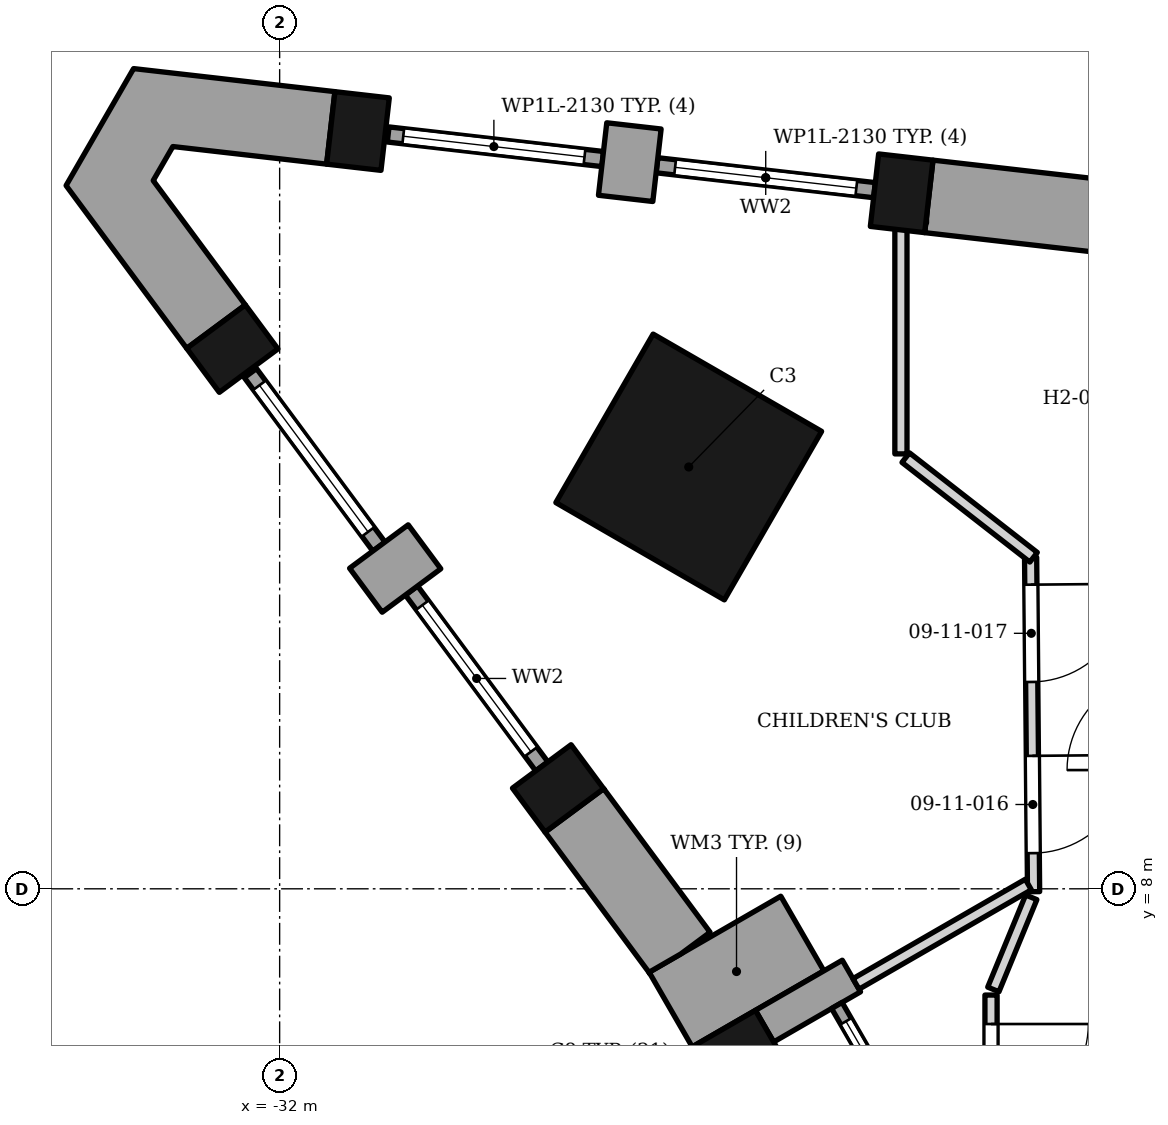
"""IFC4 building model, lengths in metres.
Left out: names, types, materials, properties, quantities, classifications, styles, units other than length and angle.
Written with IfcOpenShell. Run it as: python <this file> out.ifc"""

import sys

from ifc_helpers import new_model, si_unit, direction, frame, frame_2d, origin, origin_2d, place, context, subcontext, project, spatial, polyline, rectangle, outline, extrude, element, fill, save


model = new_model("IFC4")
c1 = context("Model", 3, precision=1e-05, world=origin(), true_north=direction((0.0, 1.0)))
c2 = subcontext(c1, "Body", "Model", "MODEL_VIEW")
j1 = project(units=[si_unit("LENGTHUNIT", "METRE"), si_unit("PLANEANGLEUNIT", "RADIAN")], contexts=[c1])
p1 = place(None, origin())
s1 = spatial("IfcSite", under=j1, at=p1, CompositionType="ELEMENT")
p2 = place(p1, origin())
s2 = spatial("IfcBuilding", under=s1, at=p2, CompositionType="ELEMENT")
p3 = place(p2, frame((0.0, 0.0, 56.2)))
s3 = spatial("IfcBuildingStorey", under=s2, at=p3, CompositionType="ELEMENT", Elevation=56.2)
p4 = place(p3, frame((-25.272, 14.937, 0.0), z_axis=(0.0, 0.0, 1.0), x_axis=(0.866025412511, -0.499999984885, 0.0)))
e1 = element("IfcColumn", 1, at=p4, inside=s3, PredefinedType="COLUMN", context=c2, shape_type="SweptSolid", body=[
    extrude(rectangle(XDim=3.2, YDim=3.2, at=origin_2d()), origin(), (0.0, 0.0, 1.0), 3.4),
])
for number, where, z_axis, x_axis in (
    (2, (-24.47, 5.311, 0.0), (0.0, 0.0, 1.0), (0.5, -0.866, 0.0)),
    (3, (-21.77, 19.438, 0.0), (0.0, 0.0, 1.0), (-0.994, 0.114, 0.0)),
    (4, (-30.712, 20.462, 0.0), (0.0, 0.0, 1.0), (-0.994, 0.114, 0.0)),
    (5, (-32.778, 16.883, 0.0), (0.0, 0.0, 1.0), (0.595, -0.804, 0.0)),
    (6, (-27.421, 9.651, 0.0), (0.0, 0.0, 1.0), (0.595, -0.804, 0.0)),
):
    element("IfcColumn", number, at=place(p3, frame(where, z_axis=z_axis, x_axis=x_axis)), inside=s3, PredefinedType="COLUMN", context=c2, shape_type="SweptSolid", body=[
        extrude(rectangle(XDim=0.9, YDim=1.2, at=origin_2d()), origin(), (0.0, 0.0, 1.0), 3.4),
    ])
p5 = place(p3, frame((-22.596, 6.566, 0.0), z_axis=(0.0, 0.0, 1.0), x_axis=(-0.866040211805, -0.499974350878, 0.0)))
e7 = element("IfcWall", 7, at=p5, inside=s3, PredefinedType="SOLIDWALL", context=c2, shape_type="SweptSolid", body=[
    extrude(rectangle(XDim=1.65, YDim=0.6, at=frame_2d((0.825, 0.0))), origin(), (0.0, 0.0, 1.0), 2.45),
])
p6 = place(p3, frame((-22.836, 6.081, 0.0), z_axis=(0.0, 0.0, 1.0), x_axis=(0.500002543286, -0.866023935413, 0.0)))
e8 = element("IfcWall", 8, at=p6, inside=s3, PredefinedType="ELEMENTEDWALL", context=c2, shape_type="SweptSolid", body=[
    extrude(rectangle(XDim=4.2, YDim=0.2, at=frame_2d((2.1, 0.0))), origin(), (0.0, 0.0, 1.0), 2.45),
])
p7 = place(p6, frame((0.3, 0.0, 0.6)))
e9 = element("IfcOpeningElement", 9, at=p7, cuts=e8, PredefinedType="OPENING", context=c2, shape_type="SweptSolid", body=[
    extrude(rectangle(XDim=2.1, YDim=1.75, at=frame_2d((1.05, 0.875))), frame((0.0, 0.11, 0.0), z_axis=(0.0, -1.0, 0.0), x_axis=(1.0, 0.0, 0.0)), (0.0, 0.0, 1.0), 0.22),
])
p8 = place(p6, frame((2.7, 0.0, 0.0)))
e10 = element("IfcOpeningElement", 10, at=p8, cuts=e8, PredefinedType="OPENING", context=c2, shape_type="SweptSolid", body=[
    extrude(rectangle(XDim=1.2, YDim=2.35, at=frame_2d((0.6, 1.175))), frame((0.0, 0.11, 0.0), z_axis=(0.0, -1.0, 0.0), x_axis=(1.0, 0.0, 0.0)), (0.0, 0.0, 1.0), 0.22),
])
p9 = place(p3, frame((-25.569, 6.014, 0.0), z_axis=(0.0, 0.0, 1.0), x_axis=(0.866022959057, 0.500004234368, 0.0)))
e11 = element("IfcWall", 11, at=p9, inside=s3, PredefinedType="SOLIDWALL", context=c2, shape_type="SweptSolid", body=[
    extrude(rectangle(XDim=2.5, YDim=1.417, at=frame_2d((1.25, 0.0))), origin(), (0.0, 0.0, 1.0), 2.63),
])
p10 = place(p3, frame((-26.173, 20.546, 0.0), z_axis=(0.0, 0.0, 1.0), x_axis=(-0.113735952551, -0.993511013073, 0.0)))
e12 = element("IfcWall", 12, at=p10, inside=s3, PredefinedType="SOLIDWALL", context=c2, shape_type="SweptSolid", body=[
    extrude(rectangle(XDim=1.2, YDim=0.9, at=frame_2d((0.6, 0.0))), origin(), (0.0, 0.0, 1.0), 2.63),
])
p11 = place(p3, frame((-22.218, 19.489, 0.0), z_axis=(0.0, 0.0, 1.0), x_axis=(-0.993504225498, 0.113795228013, 0.0)))
e13 = element("IfcWall", 13, at=p11, inside=s3, PredefinedType="ELEMENTEDWALL", context=c2, shape_type="SweptSolid", body=[
    extrude(rectangle(XDim=3.6, YDim=0.25, at=frame_2d((1.8, 0.0))), origin(), (0.0, 0.0, 1.0), 2.63),
])
p12 = place(p11, frame((0.3, 0.0, 0.3)))
e14 = element("IfcOpeningElement", 14, at=p12, cuts=e13, PredefinedType="OPENING", context=c2, shape_type="SweptSolid", body=[
    extrude(rectangle(XDim=3.0, YDim=2.13, at=frame_2d((1.5, 1.065))), frame((0.0, 0.135, 0.0), z_axis=(0.0, -1.0, 0.0), x_axis=(1.0, 0.0, 0.0)), (0.0, 0.0, 1.0), 0.27),
])
p13 = place(p3, frame((-26.686, 20.001, 0.0), z_axis=(0.0, 0.0, 1.0), x_axis=(-0.993509390647, 0.113750123938, 0.0)))
e15 = element("IfcWall", 15, at=p13, inside=s3, PredefinedType="ELEMENTEDWALL", context=c2, shape_type="SweptSolid", body=[
    extrude(rectangle(XDim=3.552, YDim=0.25, at=frame_2d((1.776, 0.0))), origin(), (0.0, 0.0, 1.0), 2.63),
])
p14 = place(p13, frame((0.302, 0.0, 0.3)))
e16 = element("IfcOpeningElement", 16, at=p14, cuts=e15, PredefinedType="OPENING", context=c2, shape_type="SweptSolid", body=[
    extrude(rectangle(XDim=3.0, YDim=2.13, at=frame_2d((1.5, 1.065))), frame((0.0, 0.135, 0.0), z_axis=(0.0, -1.0, 0.0), x_axis=(1.0, 0.0, 0.0)), (0.0, 0.0, 1.0), 0.27),
])
p15 = place(p3, frame((-30.582, 12.91, 0.0), z_axis=(0.0, 0.0, 1.0), x_axis=(0.803549985832, 0.595237280644, 0.0)))
e17 = element("IfcWall", 17, at=p15, inside=s3, PredefinedType="SOLIDWALL", context=c2, shape_type="SweptSolid", body=[
    extrude(rectangle(XDim=1.2, YDim=0.9, at=frame_2d((0.6, 0.0))), origin(), (0.0, 0.0, 1.0), 2.63),
])
p16 = place(p3, frame((-32.481, 16.481, 0.0), z_axis=(0.0, 0.0, 1.0), x_axis=(0.595304805086, -0.803499962067, 0.0)))
e18 = element("IfcWall", 18, at=p16, inside=s3, PredefinedType="ELEMENTEDWALL", context=c2, shape_type="SweptSolid", body=[
    extrude(rectangle(XDim=3.552, YDim=0.25, at=frame_2d((1.776, 0.0))), origin(), (0.0, 0.0, 1.0), 2.63),
])
p17 = place(p16, frame((0.25, 0.0, 0.3)))
e19 = element("IfcOpeningElement", 19, at=p17, cuts=e18, PredefinedType="OPENING", context=c2, shape_type="SweptSolid", body=[
    extrude(rectangle(XDim=3.0, YDim=2.13, at=frame_2d((1.5, 1.065))), frame((0.0, 0.135, 0.0), z_axis=(0.0, -1.0, 0.0), x_axis=(1.0, 0.0, 0.0)), (0.0, 0.0, 1.0), 0.27),
])
p18 = place(p3, frame((-29.832, 12.906, 0.0), z_axis=(0.0, 0.0, 1.0), x_axis=(0.595302153335, -0.803501926715, 0.0)))
e20 = element("IfcWall", 20, at=p18, inside=s3, PredefinedType="ELEMENTEDWALL", context=c2, shape_type="SweptSolid", body=[
    extrude(rectangle(XDim=3.6, YDim=0.25, at=frame_2d((1.8, 0.0))), origin(), (0.0, 0.0, 1.0), 2.63),
])
p19 = place(p18, frame((0.3, 0.0, 0.3)))
e21 = element("IfcOpeningElement", 21, at=p19, cuts=e20, PredefinedType="OPENING", context=c2, shape_type="SweptSolid", body=[
    extrude(rectangle(XDim=3.0, YDim=2.13, at=frame_2d((1.5, 1.065))), frame((0.0, 0.135, 0.0), z_axis=(0.0, -1.0, 0.0), x_axis=(1.0, 0.0, 0.0)), (0.0, 0.0, 1.0), 0.27),
])
p20 = place(p3, origin())
e22 = element("IfcWall", 22, at=p20, inside=s3, PredefinedType="SOLIDWALL", context=c2, shape_type="SweptSolid", body=[
    extrude(outline(polyline([(-21.255, 19.983), (-21.391, 18.791), (-18.472, 18.457), (-18.0, 18.532), (-18.0, 19.052), (-17.94, 19.052), (-18.335, 19.649), (-21.255, 19.983)])), origin(), (0.0, 0.0, 1.0), 2.65),
])
p21 = place(p3, origin())
e23 = element("IfcWall", 23, at=p21, inside=s3, PredefinedType="SOLIDWALL", context=c2, shape_type="SweptSolid", body=[
    extrude(outline(polyline([(-33.756, 20.207), (-31.227, 19.917), (-31.091, 21.109), (-34.402, 21.489), (-35.512, 19.565), (-33.528, 16.887), (-32.564, 17.602), (-34.08, 19.647), (-33.756, 20.207)])), origin(), (0.0, 0.0, 1.0), 2.65),
])
p22 = place(p3, origin())
e24 = element("IfcWall", 24, at=p22, inside=s3, PredefinedType="SOLIDWALL", context=c2, shape_type="SweptSolid", body=[
    extrude(outline(polyline([(-24.921, 7.285), (-26.671, 9.647), (-26.671, 9.647), (-26.671, 9.646), (-27.635, 8.932), (-25.906, 6.599), (-25.923, 6.628), (-25.403, 6.928), (-24.921, 7.285)])), origin(), (0.0, 0.0, 1.0), 2.63),
])
p23 = place(p3, frame((-20.301, 6.253, 0.0), z_axis=(0.0, 0.0, 1.0), x_axis=(0.000103755965, -0.999999994617, 0.0)))
e25 = element("IfcWall", 25, at=p23, inside=s3, PredefinedType="PARTITIONING", context=c2, shape_type="SweptSolid", body=[
    extrude(rectangle(XDim=2.353, YDim=0.2, at=frame_2d((1.177, 0.0))), origin(), (0.0, 0.0, 1.0), 2.45),
])
p24 = place(p23, frame((0.476, 0.0, 0.0)))
e26 = element("IfcOpeningElement", 26, at=p24, cuts=e25, PredefinedType="OPENING", context=c2, shape_type="SweptSolid", body=[
    extrude(rectangle(XDim=1.6, YDim=2.1, at=frame_2d((0.8, 1.05))), frame((0.0, 0.11, 0.0), z_axis=(0.0, -1.0, 0.0), x_axis=(1.0, 0.0, 0.0)), (0.0, 0.0, 1.0), 0.22),
])
p25 = place(p3, frame((-20.262, 6.345, 0.0), z_axis=(0.0, 0.0, 1.0), x_axis=(0.380749805254, 0.924678098475, 0.0)))
e27 = element("IfcWall", 27, at=p25, inside=s3, PredefinedType="PARTITIONING", context=c2, shape_type="SweptSolid", body=[
    extrude(rectangle(XDim=1.638, YDim=0.2, at=frame_2d((0.819, 0.0))), origin(), (0.0, 0.0, 1.0), 3.23),
])
p26 = place(p3, frame((-19.649, 13.452, 0.0), z_axis=(0.0, 0.0, 1.0), x_axis=(0.00887867333, -0.999960583803, 0.0)))
e28 = element("IfcWall", 28, at=p26, inside=s3, PredefinedType="PARTITIONING", context=c2, shape_type="SweptSolid", body=[
    extrude(rectangle(XDim=5.5, YDim=0.2, at=frame_2d((2.75, 0.0))), origin(), (0.0, 0.0, 1.0), 3.23),
])
p27 = place(p26, frame((3.266, 0.0, 0.0)))
e29 = element("IfcOpeningElement", 29, at=p27, cuts=e28, PredefinedType="OPENING", context=c2, shape_type="SweptSolid", body=[
    extrude(rectangle(XDim=1.6, YDim=2.1, at=frame_2d((0.8, 1.05))), frame((0.0, 0.11, 0.0), z_axis=(0.0, -1.0, 0.0), x_axis=(1.0, 0.0, 0.0)), (0.0, 0.0, 1.0), 0.22),
])
p28 = place(p26, frame((0.45, 0.0, 0.0)))
e30 = element("IfcOpeningElement", 30, at=p28, cuts=e28, PredefinedType="OPENING", context=c2, shape_type="SweptSolid", body=[
    extrude(rectangle(XDim=1.6, YDim=2.1, at=frame_2d((0.8, 1.05))), frame((0.0, 0.11, 0.0), z_axis=(0.0, -1.0, 0.0), x_axis=(1.0, 0.0, 0.0)), (0.0, 0.0, 1.0), 0.22),
])
p29 = place(p3, frame((-22.521, 6.436, 0.0), z_axis=(0.0, 0.0, 1.0), x_axis=(0.866279994271, 0.499558776848, 0.0)))
e31 = element("IfcWall", 31, at=p29, inside=s3, PredefinedType="PARTITIONING", context=c2, shape_type="SweptSolid", body=[
    extrude(rectangle(XDim=3.271, YDim=0.2, at=frame_2d((1.636, 0.0))), origin(), (0.0, 0.0, 1.0), 2.552),
])
p30 = place(p3, frame((-21.703, 15.091, 0.0), z_axis=(0.0, 0.0, 1.0), x_axis=(0.788819319895, -0.614625154513, 0.0)))
e32 = element("IfcWall", 32, at=p30, inside=s3, PredefinedType="PARTITIONING", context=c2, shape_type="SweptSolid", body=[
    extrude(rectangle(XDim=2.666, YDim=0.2, at=frame_2d((1.333, 0.0))), origin(), (0.0, 0.0, 1.0), 3.23),
])
p31 = place(p3, frame((-21.782, 19.052, 0.0), z_axis=(0.0, 0.0, 1.0), x_axis=(0.0, -1.0, 0.0)))
e33 = element("IfcWall", 33, at=p31, inside=s3, PredefinedType="PARTITIONING", context=c2, shape_type="SweptSolid", body=[
    extrude(rectangle(XDim=3.9, YDim=0.2, at=frame_2d((1.95, 0.0))), origin(), (0.0, 0.0, 1.0), 3.23),
])
p32 = place(p3, frame((-21.682, 19.052, 0.0), z_axis=(0.0, 0.0, 1.0), x_axis=(0.999999710853, 0.000760456054, 0.0)))
e34 = element("IfcWall", 34, at=p32, inside=s3, PredefinedType="PARTITIONING", context=c2, shape_type="SweptSolid", body=[
    extrude(rectangle(XDim=0.321, YDim=0.2, at=frame_2d((0.161, 0.0))), origin(), (0.0, 0.0, 1.0), 3.23),
])
p33 = place(p7, origin())
e35 = element("IfcWindow", 35, at=p33, inside=s3, PartitioningType="SINGLE_PANEL", PredefinedType="WINDOW", context=c2, shape_type="SweptSolid", body=[
    extrude(rectangle(XDim=2.1, YDim=1.75, at=frame_2d((1.05, 0.875))), frame((0.0, 0.03, 0.0), z_axis=(0.0, -1.0, 0.0), x_axis=(1.0, 0.0, 0.0)), (0.0, 0.0, 1.0), 0.06),
])
fill(e9, e35)
p34 = place(p12, origin())
e36 = element("IfcWindow", 36, at=p34, inside=s3, PartitioningType="SINGLE_PANEL", PredefinedType="WINDOW", context=c2, shape_type="SweptSolid", body=[
    extrude(rectangle(XDim=3.0, YDim=2.13, at=frame_2d((1.5, 1.065))), frame((0.0, 0.03, 0.0), z_axis=(0.0, -1.0, 0.0), x_axis=(1.0, 0.0, 0.0)), (0.0, 0.0, 1.0), 0.06),
])
fill(e14, e36)
p35 = place(p14, origin())
e37 = element("IfcWindow", 37, at=p35, inside=s3, PartitioningType="SINGLE_PANEL", PredefinedType="WINDOW", context=c2, shape_type="SweptSolid", body=[
    extrude(rectangle(XDim=3.0, YDim=2.13, at=frame_2d((1.5, 1.065))), frame((0.0, 0.03, 0.0), z_axis=(0.0, -1.0, 0.0), x_axis=(1.0, 0.0, 0.0)), (0.0, 0.0, 1.0), 0.06),
])
fill(e16, e37)
p36 = place(p17, origin())
e38 = element("IfcWindow", 38, at=p36, inside=s3, PartitioningType="SINGLE_PANEL", PredefinedType="WINDOW", context=c2, shape_type="SweptSolid", body=[
    extrude(rectangle(XDim=3.0, YDim=2.13, at=frame_2d((1.5, 1.065))), frame((0.0, 0.03, 0.0), z_axis=(0.0, -1.0, 0.0), x_axis=(1.0, 0.0, 0.0)), (0.0, 0.0, 1.0), 0.06),
])
fill(e19, e38)
p37 = place(p19, origin())
e39 = element("IfcWindow", 39, at=p37, inside=s3, PartitioningType="SINGLE_PANEL", PredefinedType="WINDOW", context=c2, shape_type="SweptSolid", body=[
    extrude(rectangle(XDim=3.0, YDim=2.13, at=frame_2d((1.5, 1.065))), frame((0.0, 0.03, 0.0), z_axis=(0.0, -1.0, 0.0), x_axis=(1.0, 0.0, 0.0)), (0.0, 0.0, 1.0), 0.06),
])
fill(e21, e39)
p38 = place(p27, origin())
e40 = element("IfcDoor", 40, at=p38, inside=s3, OperationType="DOUBLE_DOOR_SINGLE_SWING", PredefinedType="DOOR", context=c2, shape_type="SweptSolid", body=[
    extrude(rectangle(XDim=1.6, YDim=2.1, at=frame_2d((0.8, 1.05))), frame((0.0, 0.025, 0.0), z_axis=(0.0, -1.0, 0.0), x_axis=(1.0, 0.0, 0.0)), (0.0, 0.0, 1.0), 0.05),
])
fill(e29, e40)
p39 = place(p28, origin())
e41 = element("IfcDoor", 41, at=p39, inside=s3, OperationType="DOUBLE_DOOR_SINGLE_SWING", PredefinedType="DOOR", context=c2, shape_type="SweptSolid", body=[
    extrude(rectangle(XDim=1.6, YDim=2.1, at=frame_2d((0.8, 1.05))), frame((0.0, 0.025, 0.0), z_axis=(0.0, -1.0, 0.0), x_axis=(1.0, 0.0, 0.0)), (0.0, 0.0, 1.0), 0.05),
])
fill(e30, e41)
p40 = place(p24, origin())
e42 = element("IfcDoor", 42, at=p40, inside=s3, OperationType="DOUBLE_DOOR_SINGLE_SWING", PredefinedType="DOOR", context=c2, shape_type="SweptSolid", body=[
    extrude(rectangle(XDim=1.6, YDim=2.1, at=frame_2d((0.8, 1.05))), frame((0.0, 0.025, 0.0), z_axis=(0.0, -1.0, 0.0), x_axis=(1.0, 0.0, 0.0)), (0.0, 0.0, 1.0), 0.05),
])
fill(e26, e42)
save(model, sys.argv[1])
